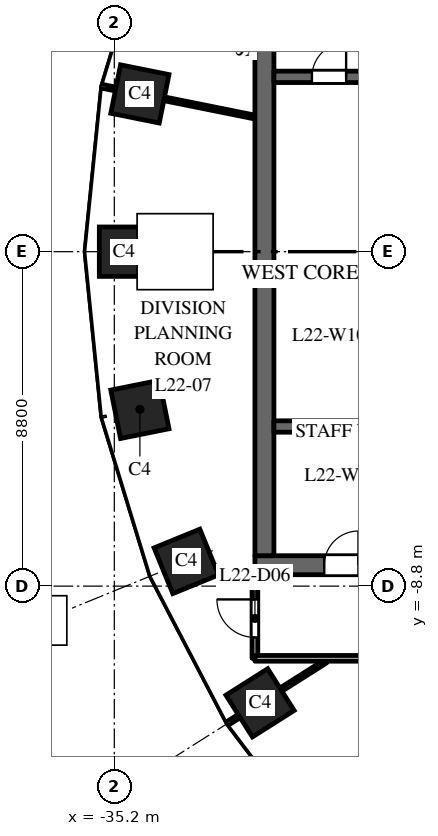
"""IFC4 building model, lengths in metres.
Left out: names, types, materials, properties, quantities, classifications, styles, units other than length and angle.
Written with IfcOpenShell. Run it as: python <this file> out.ifc"""

import sys

from ifc_helpers import new_model, si_unit, direction, frame, frame_2d, origin, origin_2d, place, context, subcontext, project, spatial, rectangle, extrude, element, fill, save


model = new_model("IFC4")
c1 = context("Model", 3, precision=1e-05, world=origin(), true_north=direction((0.0, 1.0)))
c2 = subcontext(c1, "Body", "Model", "MODEL_VIEW")
j1 = project(units=[si_unit("LENGTHUNIT", "METRE"), si_unit("PLANEANGLEUNIT", "RADIAN")], contexts=[c1])
p1 = place(None, origin())
s1 = spatial("IfcSite", under=j1, at=p1, CompositionType="ELEMENT")
p2 = place(p1, origin())
s2 = spatial("IfcBuilding", under=s1, at=p2, CompositionType="ELEMENT")
p3 = place(p2, frame((0.0, 0.0, 100.0)))
s3 = spatial("IfcBuildingStorey", under=s2, at=p3, CompositionType="ELEMENT", Elevation=100.0)
for number, where, z_axis, x_axis in (
    (1, (-34.527, 4.151, 0.0), (0.0, 0.0, 1.0), (-0.197, -0.98, 0.0)),
    (2, (-34.945, 0.0, 0.0), (0.0, 0.0, 1.0), (0.0, -1.0, 0.0)),
    (3, (-34.527, -4.151, 0.0), (0.0, 0.0, 1.0), (0.197, -0.98, 0.0)),
    (4, (-33.305, -8.149, 0.0), (0.0, 0.0, 1.0), (0.379, -0.925, 0.0)),
    (5, (-31.365, -11.871, 0.0), (0.0, 0.0, 1.0), (0.535, -0.845, 0.0)),
):
    element("IfcColumn", number, at=place(p3, frame(where, z_axis=z_axis, x_axis=x_axis)), inside=s3, PredefinedType="COLUMN", context=c2, shape_type="SweptSolid", body=[
        extrude(rectangle(XDim=1.3, YDim=1.3, at=origin_2d()), origin(), (0.0, 0.0, 1.0), 4.0),
    ])
p4 = place(p3, frame((-16.5, -8.25, 0.0), z_axis=(0.0, 0.0, 1.0), x_axis=(-1.0, 0.0, 0.0)))
e6 = element("IfcWall", 6, at=p4, inside=s3, PredefinedType="SHEAR", context=c2, shape_type="SweptSolid", body=[
    extrude(rectangle(XDim=15.0, YDim=0.5, at=frame_2d((7.5, 0.0))), origin(), (0.0, 0.0, 1.0), 3.7),
])
p5 = place(p4, frame((6.9, 0.0, 0.0)))
e7 = element("IfcOpeningElement", 7, at=p5, cuts=e6, PredefinedType="OPENING", context=c2, shape_type="SweptSolid", body=[
    extrude(rectangle(XDim=1.2, YDim=2.1, at=frame_2d((0.6, 1.05))), frame((0.0, 0.26, 0.0), z_axis=(0.0, -1.0, 0.0), x_axis=(1.0, 0.0, 0.0)), (0.0, 0.0, 1.0), 0.52),
])
p6 = place(p4, frame((12.275, 0.0, 0.0)))
e8 = element("IfcOpeningElement", 8, at=p6, cuts=e6, PredefinedType="OPENING", context=c2, shape_type="SweptSolid", body=[
    extrude(rectangle(XDim=0.9, YDim=2.1, at=frame_2d((0.45, 1.05))), frame((0.0, 0.26, 0.0), z_axis=(0.0, -1.0, 0.0), x_axis=(1.0, 0.0, 0.0)), (0.0, 0.0, 1.0), 0.52),
])
p7 = place(p3, frame((-31.25, -8.0, 0.0), z_axis=(0.0, 0.0, 1.0), x_axis=(0.0, 1.0, 0.0)))
e9 = element("IfcWall", 9, at=p7, inside=s3, PredefinedType="SHEAR", context=c2, shape_type="SweptSolid", body=[
    extrude(rectangle(XDim=16.0, YDim=0.5, at=frame_2d((8.0, 0.0))), origin(), (0.0, 0.0, 1.0), 3.7),
])
p8 = place(p3, frame((-24.9, 4.6, 0.0), z_axis=(0.0, 0.0, 1.0), x_axis=(-1.0, 0.0, 0.0)))
e10 = element("IfcWall", 10, at=p8, inside=s3, PredefinedType="SHEAR", context=c2, shape_type="SweptSolid", body=[
    extrude(rectangle(XDim=6.1, YDim=0.3, at=frame_2d((3.05, 0.0))), origin(), (0.0, 0.0, 1.0), 3.7),
])
p9 = place(p8, frame((4.2, 0.0, 0.0)))
e11 = element("IfcOpeningElement", 11, at=p9, cuts=e10, PredefinedType="OPENING", context=c2, shape_type="SweptSolid", body=[
    extrude(rectangle(XDim=0.9, YDim=2.1, at=frame_2d((0.45, 1.05))), frame((0.0, 0.16, 0.0), z_axis=(0.0, -1.0, 0.0), x_axis=(1.0, 0.0, 0.0)), (0.0, 0.0, 1.0), 0.32),
])
p10 = place(p3, frame((-24.9, -4.6, 0.0), z_axis=(0.0, 0.0, 1.0), x_axis=(-1.0, 0.0, 0.0)))
e12 = element("IfcWall", 12, at=p10, inside=s3, PredefinedType="SHEAR", context=c2, shape_type="SweptSolid", body=[
    extrude(rectangle(XDim=6.1, YDim=0.3, at=frame_2d((3.05, 0.0))), origin(), (0.0, 0.0, 1.0), 3.7),
])
p11 = place(p3, frame((-35.512, 4.349, 0.0), z_axis=(0.0, 0.0, 1.0), x_axis=(0.980357474535, -0.197228857227, 0.0)))
e13 = element("IfcWall", 13, at=p11, inside=s3, PredefinedType="PARTITIONING", context=c2, shape_type="SweptSolid", body=[
    extrude(rectangle(XDim=4.092, YDim=0.1, at=frame_2d((2.046, 0.0))), origin(), (0.0, 0.0, 1.0), 3.2),
])
p12 = place(p3, frame((-32.212, -12.408, 0.0), z_axis=(0.0, 0.0, 1.0), x_axis=(0.844810627195, 0.535065420467, 0.0)))
e14 = element("IfcWall", 14, at=p12, inside=s3, PredefinedType="PARTITIONING", context=c2, shape_type="SweptSolid", body=[
    extrude(rectangle(XDim=3.048, YDim=0.1, at=frame_2d((1.524, 0.0))), origin(), (0.0, 0.0, 1.0), 3.7),
])
p13 = place(p3, frame((-31.5, -10.7, 0.0), z_axis=(0.0, 0.0, 1.0), x_axis=(0.0, 1.0, 0.0)))
e15 = element("IfcWall", 15, at=p13, inside=s3, PredefinedType="PARTITIONING", context=c2, shape_type="SweptSolid", body=[
    extrude(rectangle(XDim=2.2, YDim=0.15, at=frame_2d((1.1, 0.0))), origin(), (0.0, 0.0, 1.0), 3.7),
])
p14 = place(p13, frame((0.55, 0.0, 0.0)))
e16 = element("IfcOpeningElement", 16, at=p14, cuts=e15, PredefinedType="OPENING", context=c2, shape_type="SweptSolid", body=[
    extrude(rectangle(XDim=1.0, YDim=2.1, at=frame_2d((0.5, 1.05))), frame((0.0, 0.085, 0.0), z_axis=(0.0, -1.0, 0.0), x_axis=(1.0, 0.0, 0.0)), (0.0, 0.0, 1.0), 0.17),
])
p15 = place(p3, frame((-31.5, -10.7, 0.0), z_axis=(0.0, 0.0, 1.0), x_axis=(1.0, 0.0, 0.0)))
e17 = element("IfcWall", 17, at=p15, inside=s3, PredefinedType="PARTITIONING", context=c2, shape_type="SweptSolid", body=[
    extrude(rectangle(XDim=15.0, YDim=0.15, at=frame_2d((7.5, 0.0))), origin(), (0.0, 0.0, 1.0), 3.1),
])
p16 = place(p15, frame((13.379, 0.0, 0.0)))
e18 = element("IfcOpeningElement", 18, at=p16, cuts=e17, PredefinedType="OPENING", context=c2, shape_type="SweptSolid", body=[
    extrude(rectangle(XDim=1.0, YDim=2.1, at=frame_2d((0.5, 1.05))), frame((0.0, 0.085, 0.0), z_axis=(0.0, -1.0, 0.0), x_axis=(1.0, 0.0, 0.0)), (0.0, 0.0, 1.0), 0.17),
])
p17 = place(p6, origin())
e19 = element("IfcDoor", 19, at=p17, inside=s3, OperationType="SINGLE_SWING_LEFT", PredefinedType="DOOR", context=c2, shape_type="SweptSolid", body=[
    extrude(rectangle(XDim=0.9, YDim=2.1, at=frame_2d((0.45, 1.05))), frame((0.0, 0.025, 0.0), z_axis=(0.0, -1.0, 0.0), x_axis=(1.0, 0.0, 0.0)), (0.0, 0.0, 1.0), 0.05),
])
fill(e8, e19)
p18 = place(p9, origin())
e20 = element("IfcDoor", 20, at=p18, inside=s3, OperationType="SINGLE_SWING_LEFT", PredefinedType="DOOR", context=c2, shape_type="SweptSolid", body=[
    extrude(rectangle(XDim=0.9, YDim=2.1, at=frame_2d((0.45, 1.05))), frame((0.0, 0.025, 0.0), z_axis=(0.0, -1.0, 0.0), x_axis=(1.0, 0.0, 0.0)), (0.0, 0.0, 1.0), 0.05),
])
fill(e11, e20)
p19 = place(p14, origin())
e21 = element("IfcDoor", 21, at=p19, inside=s3, OperationType="SINGLE_SWING_RIGHT", PredefinedType="DOOR", context=c2, shape_type="SweptSolid", body=[
    extrude(rectangle(XDim=1.0, YDim=2.1, at=frame_2d((0.5, 1.05))), frame((0.0, 0.025, 0.0), z_axis=(0.0, -1.0, 0.0), x_axis=(1.0, 0.0, 0.0)), (0.0, 0.0, 1.0), 0.05),
])
fill(e16, e21)
save(model, sys.argv[1])
